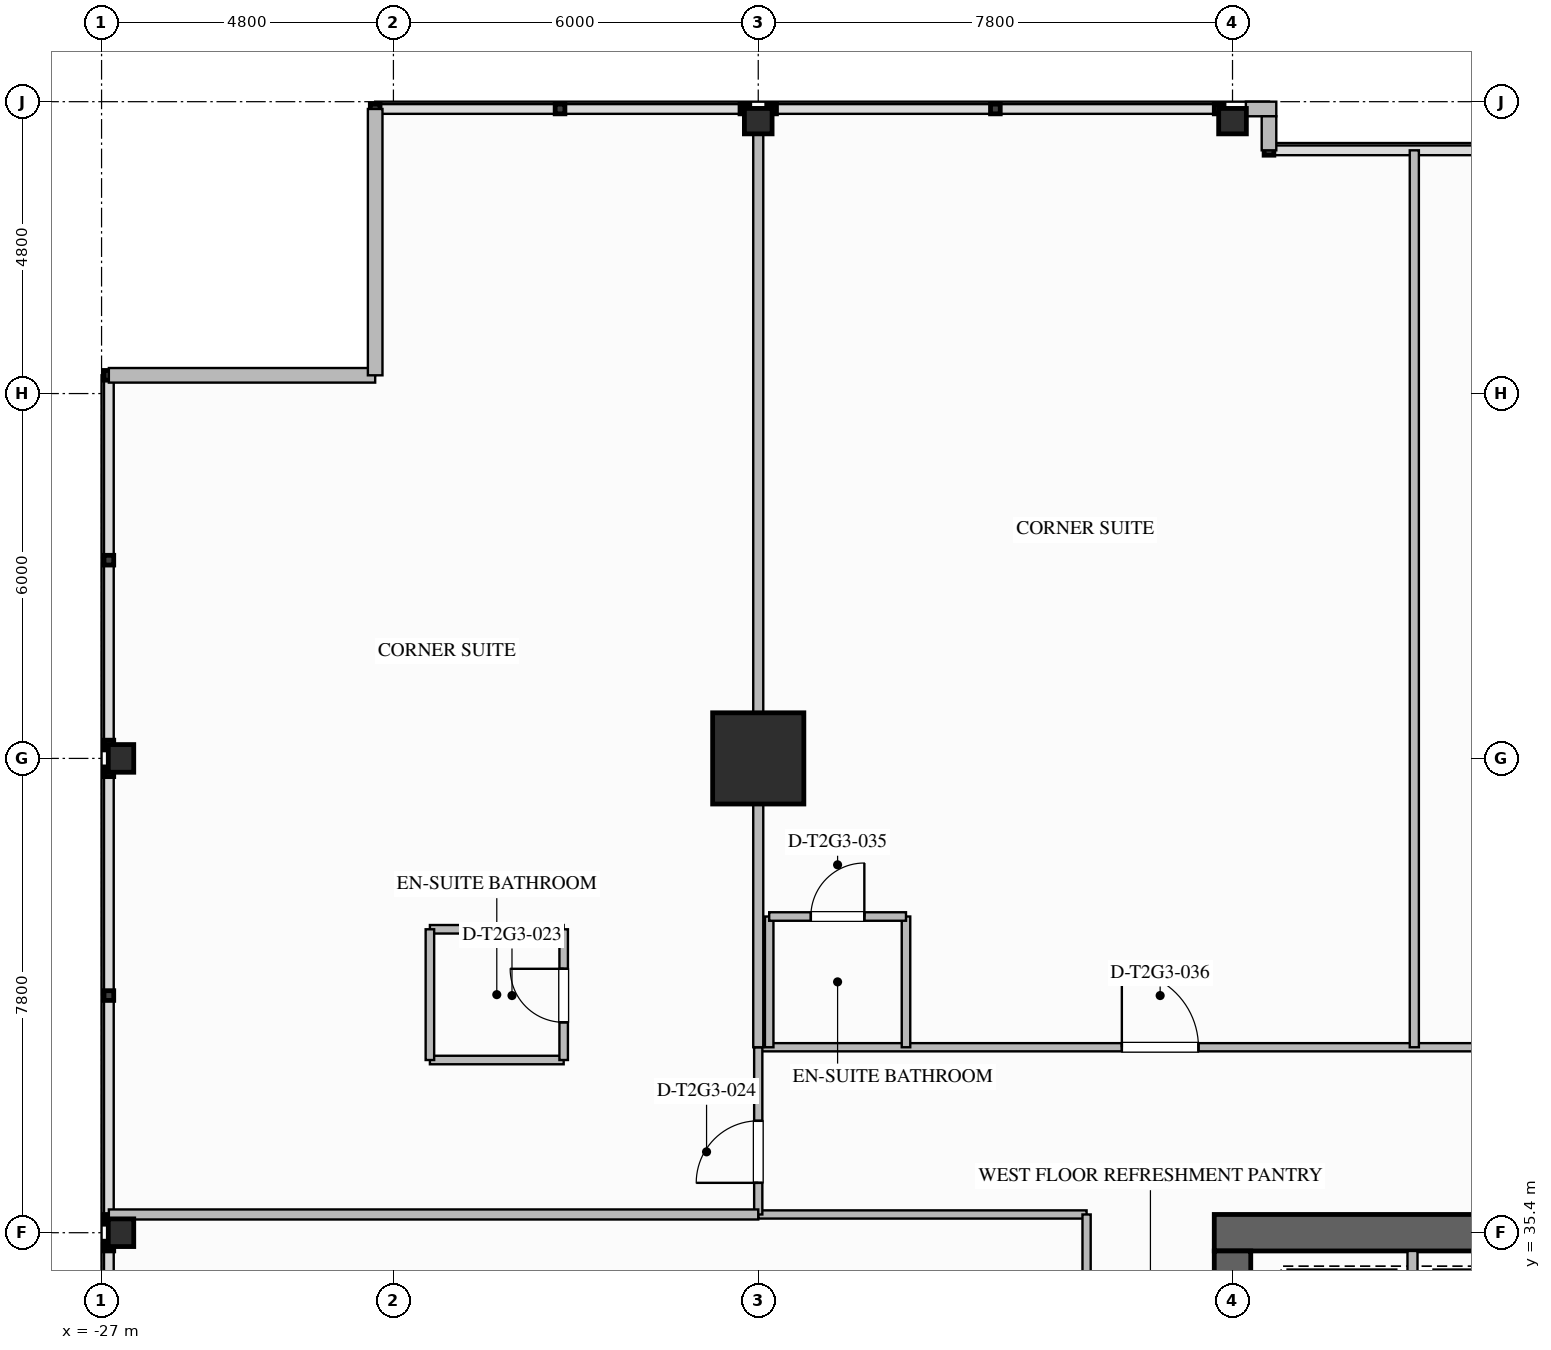
"""IFC4 building model, lengths in metres.
Left out: names, types, materials, properties, quantities, classifications, styles, units other than length and angle.
Written with IfcOpenShell. Run it as: python <this file> out.ifc"""

import sys

from ifc_helpers import new_model, si_unit, direction, frame, frame_2d, origin, origin_2d, place, context, subcontext, project, spatial, rectangle, i_section, extrude, element, fill, save


model = new_model("IFC4")
c1 = context("Model", 3, precision=1e-05, world=origin(), true_north=direction((0.0, 1.0)))
c2 = subcontext(c1, "Body", "Model", "MODEL_VIEW")
j1 = project(units=[si_unit("LENGTHUNIT", "METRE"), si_unit("PLANEANGLEUNIT", "RADIAN")], contexts=[c1])
p1 = place(None, origin())
s1 = spatial("IfcSite", under=j1, at=p1, CompositionType="ELEMENT")
p2 = place(p1, origin())
s2 = spatial("IfcBuilding", under=s1, at=p2, CompositionType="ELEMENT")
p3 = place(p2, frame((0.0, 0.0, 112.8)))
s3 = spatial("IfcBuildingStorey", under=s2, at=p3, CompositionType="ELEMENT", Elevation=112.8)
p4 = place(p3, frame((-8.7, 35.4, 0.0), z_axis=(0.0, 0.0, 1.0), x_axis=(1.0, 0.0, 0.0)))
e1 = element("IfcWall", 1, at=p4, inside=s3, PredefinedType="SHEAR", context=c2, shape_type="SweptSolid", body=[
    extrude(rectangle(XDim=17.4, YDim=0.6, at=frame_2d((8.7, 0.0))), origin(), (0.0, 0.0, 1.0), 3.5),
])
p5 = place(p3, frame((-8.4, 18.9, 0.0), z_axis=(0.0, 0.0, 1.0), x_axis=(0.0, 1.0, 0.0)))
e2 = element("IfcWall", 2, at=p5, inside=s3, PredefinedType="SHEAR", context=c2, shape_type="SweptSolid", body=[
    extrude(rectangle(XDim=16.2, YDim=0.6, at=frame_2d((8.1, 0.0))), origin(), (0.0, 0.0, 1.0), 3.5),
])
p6 = place(p5, frame((4.5, 0.0, 0.0)))
e3 = element("IfcOpeningElement", 3, at=p6, cuts=e2, PredefinedType="OPENING", context=c2, shape_type="SweptSolid", body=[
    extrude(rectangle(XDim=1.08, YDim=2.04, at=frame_2d((0.54, 1.02))), frame((0.0, 0.31, 0.0), z_axis=(0.0, -1.0, 0.0), x_axis=(1.0, 0.0, 0.0)), (0.0, 0.0, 1.0), 0.62),
])
p7 = place(p3, frame((-16.2, 43.2, 0.0), z_axis=(0.0, 0.0, 1.0), x_axis=(1.0, 0.0, 0.0)))
e4 = element("IfcColumn", 4, at=p7, inside=s3, PredefinedType="COLUMN", context=c2, shape_type="SweptSolid", body=[
    extrude(rectangle(XDim=1.5, YDim=1.5, at=origin_2d()), origin(), (0.0, 0.0, 1.0), 3.5),
])
for number, where, z_axis, x_axis in (
    (5, (-26.68, 35.4, 0.0), (0.0, 0.0, 1.0), (1.0, 0.0, 0.0)),
    (6, (-26.68, 43.2, 0.0), (0.0, 0.0, 1.0), (1.0, 0.0, 0.0)),
    (7, (-16.2, 53.68, 0.0), (0.0, 0.0, 1.0), (0.0, 1.0, 0.0)),
    (8, (-8.4, 53.68, 0.0), (0.0, 0.0, 1.0), (0.0, 1.0, 0.0)),
):
    element("IfcColumn", number, at=place(p3, frame(where, z_axis=z_axis, x_axis=x_axis)), inside=s3, PredefinedType="COLUMN", context=c2, shape_type="SweptSolid", body=[
        extrude(i_section(OverallWidth=0.418, OverallDepth=0.455, WebThickness=0.042, FlangeThickness=0.068, FilletRadius=0.03, at=origin_2d()), origin(), (0.0, 0.0, 1.0), 3.497),
    ])
p8 = place(p3, frame((-8.18, 53.88, 0.0), z_axis=(0.0, 0.0, 1.0), x_axis=(1.0, 0.0, 0.0)))
e9 = element("IfcWall", 9, at=p8, inside=s3, PredefinedType="STANDARD", context=c2, shape_type="SweptSolid", body=[
    extrude(rectangle(XDim=0.5, YDim=0.24, at=frame_2d((0.25, 0.0))), origin(), (0.0, 0.0, 1.0), 3.24),
])
for number, where, z_axis, x_axis in (
    (10, (-26.88, 49.5, 0.0), (0.0, 0.0, 1.0), (1.0, 0.0, 0.0)),
    (11, (-22.5, 49.5, 0.0), (0.0, 0.0, 1.0), (0.0, 1.0, 0.0)),
):
    element("IfcWall", number, at=place(p3, frame(where, z_axis=z_axis, x_axis=x_axis)), inside=s3, PredefinedType="STANDARD", context=c2, shape_type="SweptSolid", body=[
        extrude(rectangle(XDim=4.38, YDim=0.24, at=frame_2d((2.19, 0.0))), origin(), (0.0, 0.0, 1.0), 3.24),
    ])
p9 = place(p3, frame((-7.8, 53.76, 0.0), z_axis=(0.0, 0.0, 1.0), x_axis=(0.0, -1.0, 0.0)))
e12 = element("IfcWall", 12, at=p9, inside=s3, PredefinedType="STANDARD", context=c2, shape_type="SweptSolid", body=[
    extrude(rectangle(XDim=0.56, YDim=0.24, at=frame_2d((0.28, 0.0))), origin(), (0.0, 0.0, 1.0), 3.24),
])
p10 = place(p3, frame((-5.44, 32.22, 0.0), z_axis=(0.0, 0.0, 1.0), x_axis=(0.0, 1.0, 0.0)))
e13 = element("IfcWall", 13, at=p10, inside=s3, PredefinedType="PARTITIONING", context=c2, shape_type="SweptSolid", body=[
    extrude(rectangle(XDim=2.88, YDim=0.165, at=frame_2d((1.44, 0.0))), origin(), (0.0, 0.0, 1.0), 3.24),
])
p11 = place(p3, frame((-16.2, 35.7, 0.0), z_axis=(0.0, 0.0, 1.0), x_axis=(1.0, 0.0, 0.0)))
e14 = element("IfcWall", 14, at=p11, inside=s3, PredefinedType="PARTITIONING", context=c2, shape_type="SweptSolid", body=[
    extrude(rectangle(XDim=5.4, YDim=0.135, at=frame_2d((2.7, 0.0))), origin(), (0.0, 0.0, 1.0), 3.24),
])
p12 = place(p3, frame((-16.2, 38.45, 0.0), z_axis=(0.0, 0.0, 1.0), x_axis=(1.0, 0.0, 0.0)))
e15 = element("IfcWall", 15, at=p12, inside=s3, PredefinedType="PARTITIONING", context=c2, shape_type="SweptSolid", body=[
    extrude(rectangle(XDim=24.9, YDim=0.135, at=frame_2d((12.45, 0.0))), origin(), (0.0, 0.0, 1.0), 3.24),
])
p13 = place(p12, frame((5.98, 0.0, 0.0)))
e16 = element("IfcOpeningElement", 16, at=p13, cuts=e15, PredefinedType="OPENING", context=c2, shape_type="SweptSolid", body=[
    extrude(rectangle(XDim=1.26, YDim=2.2, at=frame_2d((0.63, 1.1))), frame((0.0, 0.077, 0.0), z_axis=(0.0, -1.0, 0.0), x_axis=(1.0, 0.0, 0.0)), (0.0, 0.0, 1.0), 0.155),
])
p14 = place(p12, frame((16.0, 0.0, 0.0)))
e17 = element("IfcOpeningElement", 17, at=p14, cuts=e15, PredefinedType="OPENING", context=c2, shape_type="SweptSolid", body=[
    extrude(rectangle(XDim=1.26, YDim=2.2, at=frame_2d((0.63, 1.1))), frame((0.0, 0.077, 0.0), z_axis=(0.0, -1.0, 0.0), x_axis=(1.0, 0.0, 0.0)), (0.0, 0.0, 1.0), 0.155),
])
p15 = place(p3, frame((-10.8, 18.3, 0.0), z_axis=(0.0, 0.0, 1.0), x_axis=(0.0, 1.0, 0.0)))
e18 = element("IfcWall", 18, at=p15, inside=s3, PredefinedType="PARTITIONING", context=c2, shape_type="SweptSolid", body=[
    extrude(rectangle(XDim=17.4, YDim=0.135, at=frame_2d((8.7, 0.0))), origin(), (0.0, 0.0, 1.0), 3.24),
])
p16 = place(p15, frame((6.785, 0.0, 0.0)))
e19 = element("IfcOpeningElement", 19, at=p16, cuts=e18, PredefinedType="OPENING", context=c2, shape_type="SweptSolid", body=[
    extrude(rectangle(XDim=1.26, YDim=2.2, at=frame_2d((0.63, 1.1))), frame((0.0, 0.077, 0.0), z_axis=(0.0, -1.0, 0.0), x_axis=(1.0, 0.0, 0.0)), (0.0, 0.0, 1.0), 0.155),
])
p17 = place(p15, frame((9.355, 0.0, 0.0)))
e20 = element("IfcOpeningElement", 20, at=p17, cuts=e18, PredefinedType="OPENING", context=c2, shape_type="SweptSolid", body=[
    extrude(rectangle(XDim=1.26, YDim=2.2, at=frame_2d((0.63, 1.1))), frame((0.0, 0.077, 0.0), z_axis=(0.0, -1.0, 0.0), x_axis=(1.0, 0.0, 0.0)), (0.0, 0.0, 1.0), 0.155),
])
p18 = place(p3, frame((-16.2, 35.7, 0.0), z_axis=(0.0, 0.0, 1.0), x_axis=(0.0, 1.0, 0.0)))
e21 = element("IfcWall", 21, at=p18, inside=s3, PredefinedType="PARTITIONING", context=c2, shape_type="SweptSolid", body=[
    extrude(rectangle(XDim=2.75, YDim=0.135, at=frame_2d((1.375, 0.0))), origin(), (0.0, 0.0, 1.0), 2.452),
])
p19 = place(p18, frame((0.52, 0.0, 0.0)))
e22 = element("IfcOpeningElement", 22, at=p19, cuts=e21, PredefinedType="OPENING", context=c2, shape_type="SweptSolid", body=[
    extrude(rectangle(XDim=1.02, YDim=2.15, at=frame_2d((0.51, 1.075))), frame((0.0, 0.077, 0.0), z_axis=(0.0, -1.0, 0.0), x_axis=(1.0, 0.0, 0.0)), (0.0, 0.0, 1.0), 0.155),
])
p20 = place(p3, frame((-16.2, 38.45, 0.0), z_axis=(0.0, 0.0, 1.0), x_axis=(0.0, 1.0, 0.0)))
e23 = element("IfcWall", 23, at=p20, inside=s3, PredefinedType="PARTITIONING", context=c2, shape_type="SweptSolid", body=[
    extrude(rectangle(XDim=15.43, YDim=0.165, at=frame_2d((7.715, 0.0))), origin(), (0.0, 0.0, 1.0), 2.452),
])
p21 = place(p3, frame((-26.88, 35.7, 0.0), z_axis=(0.0, 0.0, 1.0), x_axis=(1.0, 0.0, 0.0)))
e24 = element("IfcWall", 24, at=p21, inside=s3, PredefinedType="PARTITIONING", context=c2, shape_type="SweptSolid", body=[
    extrude(rectangle(XDim=10.68, YDim=0.165, at=frame_2d((5.34, 0.0))), origin(), (0.0, 0.0, 1.0), 2.452),
])
for number, where, z_axis, x_axis in (
    (25, (-21.6, 38.24, 0.0), (0.0, 0.0, 1.0), (1.0, 0.0, 0.0)),
    (26, (-21.6, 40.39, 0.0), (0.0, 0.0, 1.0), (1.0, 0.0, 0.0)),
):
    element("IfcWall", number, at=place(p3, frame(where, z_axis=z_axis, x_axis=x_axis)), inside=s3, PredefinedType="PLUMBINGWALL", context=c2, shape_type="SweptSolid", body=[
        extrude(rectangle(XDim=2.2, YDim=0.14, at=frame_2d((1.1, 0.0))), origin(), (0.0, 0.0, 1.0), 3.24),
    ])
p22 = place(p3, frame((-21.6, 38.24, 0.0), z_axis=(0.0, 0.0, 1.0), x_axis=(0.0, 1.0, 0.0)))
e27 = element("IfcWall", 27, at=p22, inside=s3, PredefinedType="PLUMBINGWALL", context=c2, shape_type="SweptSolid", body=[
    extrude(rectangle(XDim=2.15, YDim=0.14, at=frame_2d((1.075, 0.0))), origin(), (0.0, 0.0, 1.0), 3.24),
])
p23 = place(p3, frame((-19.4, 38.24, 0.0), z_axis=(0.0, 0.0, 1.0), x_axis=(0.0, 1.0, 0.0)))
e28 = element("IfcWall", 28, at=p23, inside=s3, PredefinedType="PLUMBINGWALL", context=c2, shape_type="SweptSolid", body=[
    extrude(rectangle(XDim=2.15, YDim=0.14, at=frame_2d((1.075, 0.0))), origin(), (0.0, 0.0, 1.0), 3.24),
])
p24 = place(p23, frame((0.62, 0.0, 0.0)))
e29 = element("IfcOpeningElement", 29, at=p24, cuts=e28, PredefinedType="OPENING", context=c2, shape_type="SweptSolid", body=[
    extrude(rectangle(XDim=0.88, YDim=2.1, at=frame_2d((0.44, 1.05))), frame((0.0, 0.08, 0.0), z_axis=(0.0, -1.0, 0.0), x_axis=(1.0, 0.0, 0.0)), (0.0, 0.0, 1.0), 0.16),
])
p25 = place(p3, frame((-16.02, 38.45, 0.0), z_axis=(0.0, 0.0, 1.0), x_axis=(0.0, 1.0, 0.0)))
e30 = element("IfcWall", 30, at=p25, inside=s3, PredefinedType="PLUMBINGWALL", context=c2, shape_type="SweptSolid", body=[
    extrude(rectangle(XDim=2.15, YDim=0.14, at=frame_2d((1.075, 0.0))), origin(), (0.0, 0.0, 1.0), 2.452),
])
p26 = place(p3, frame((-13.77, 38.45, 0.0), z_axis=(0.0, 0.0, 1.0), x_axis=(0.0, 1.0, 0.0)))
e31 = element("IfcWall", 31, at=p26, inside=s3, PredefinedType="PLUMBINGWALL", context=c2, shape_type="SweptSolid", body=[
    extrude(rectangle(XDim=2.15, YDim=0.14, at=frame_2d((1.075, 0.0))), origin(), (0.0, 0.0, 1.0), 3.24),
])
p27 = place(p3, frame((-16.02, 40.6, 0.0), z_axis=(0.0, 0.0, 1.0), x_axis=(1.0, 0.0, 0.0)))
e32 = element("IfcWall", 32, at=p27, inside=s3, PredefinedType="PLUMBINGWALL", context=c2, shape_type="SweptSolid", body=[
    extrude(rectangle(XDim=2.25, YDim=0.14, at=frame_2d((1.125, 0.0))), origin(), (0.0, 0.0, 1.0), 3.24),
])
p28 = place(p27, frame((0.685, 0.0, 0.0)))
e33 = element("IfcOpeningElement", 33, at=p28, cuts=e32, PredefinedType="OPENING", context=c2, shape_type="SweptSolid", body=[
    extrude(rectangle(XDim=0.88, YDim=2.1, at=frame_2d((0.44, 1.05))), frame((0.0, 0.08, 0.0), z_axis=(0.0, -1.0, 0.0), x_axis=(1.0, 0.0, 0.0)), (0.0, 0.0, 1.0), 0.16),
])
p29 = place(p3, frame((-5.41, 38.45, 0.0), z_axis=(0.0, 0.0, 1.0), x_axis=(0.0, 1.0, 0.0)))
e34 = element("IfcWall", 34, at=p29, inside=s3, PredefinedType="PARTITIONING", context=c2, shape_type="SweptSolid", body=[
    extrude(rectangle(XDim=14.75, YDim=0.15, at=frame_2d((7.375, 0.0))), origin(), (0.0, 0.0, 1.0), 3.24),
])
p30 = place(p24, origin())
e35 = element("IfcDoor", 35, at=p30, inside=s3, OperationType="SINGLE_SWING_RIGHT", PredefinedType="DOOR", context=c2, shape_type="SweptSolid", body=[
    extrude(rectangle(XDim=0.88, YDim=2.1, at=frame_2d((0.44, 1.05))), frame((0.0, 0.025, 0.0), z_axis=(0.0, -1.0, 0.0), x_axis=(1.0, 0.0, 0.0)), (0.0, 0.0, 1.0), 0.05),
])
fill(e29, e35)
p31 = place(p19, origin())
e36 = element("IfcDoor", 36, at=p31, inside=s3, OperationType="SINGLE_SWING_LEFT", PredefinedType="DOOR", context=c2, shape_type="SweptSolid", body=[
    extrude(rectangle(XDim=1.02, YDim=2.15, at=frame_2d((0.51, 1.075))), frame((0.0, 0.025, 0.0), z_axis=(0.0, -1.0, 0.0), x_axis=(1.0, 0.0, 0.0)), (0.0, 0.0, 1.0), 0.05),
])
fill(e22, e36)
p32 = place(p28, origin())
e37 = element("IfcDoor", 37, at=p32, inside=s3, OperationType="SINGLE_SWING_RIGHT", PredefinedType="DOOR", context=c2, shape_type="SweptSolid", body=[
    extrude(rectangle(XDim=0.88, YDim=2.1, at=frame_2d((0.44, 1.05))), frame((0.0, 0.025, 0.0), z_axis=(0.0, -1.0, 0.0), x_axis=(1.0, 0.0, 0.0)), (0.0, 0.0, 1.0), 0.05),
])
fill(e33, e37)
p33 = place(p13, origin())
e38 = element("IfcDoor", 38, at=p33, inside=s3, OperationType="SINGLE_SWING_LEFT", PredefinedType="DOOR", context=c2, shape_type="SweptSolid", body=[
    extrude(rectangle(XDim=1.26, YDim=2.2, at=frame_2d((0.63, 1.1))), frame((0.0, 0.025, 0.0), z_axis=(0.0, -1.0, 0.0), x_axis=(1.0, 0.0, 0.0)), (0.0, 0.0, 1.0), 0.05),
])
fill(e16, e38)
save(model, sys.argv[1])
